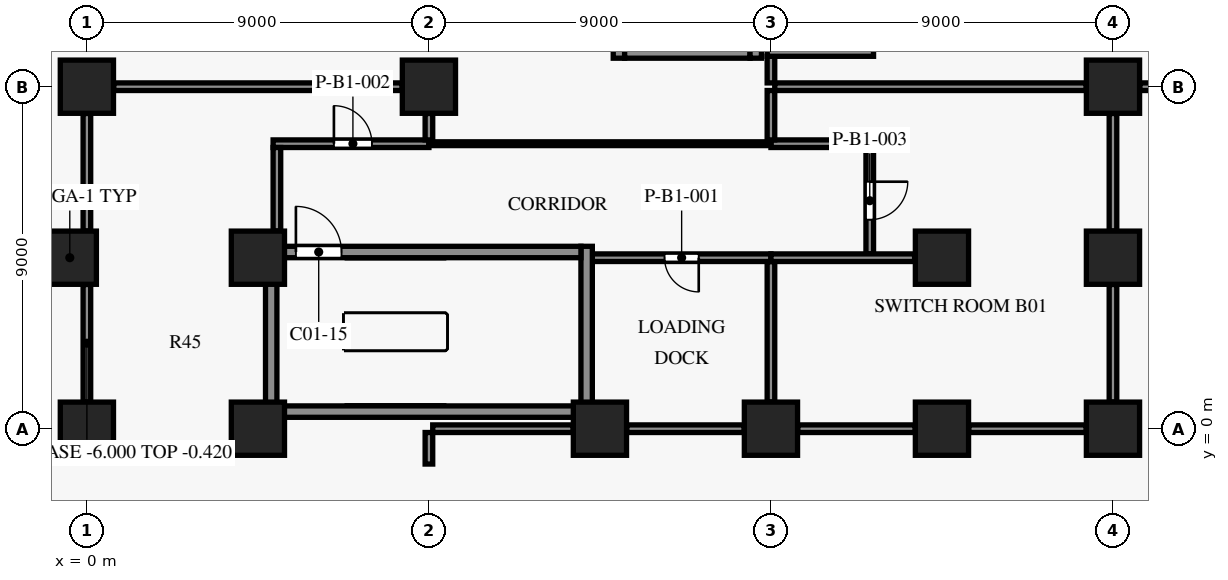
"""IFC4 building model, lengths in metres.
Left out: names, types, materials, properties, quantities, classifications, styles, units other than length and angle.
Written with IfcOpenShell. Run it as: python <this file> out.ifc"""

import sys

from ifc_helpers import new_model, si_unit, direction, frame, frame_2d, origin, origin_2d, place, context, subcontext, project, spatial, rectangle, extrude, element, fill, save


model = new_model("IFC4")
c1 = context("Model", 3, precision=1e-05, world=origin(), true_north=direction((0.0, 1.0)))
c2 = subcontext(c1, "Body", "Model", "MODEL_VIEW")
j1 = project(units=[si_unit("LENGTHUNIT", "METRE"), si_unit("PLANEANGLEUNIT", "RADIAN")], contexts=[c1])
p1 = place(None, origin())
s1 = spatial("IfcSite", under=j1, at=p1, CompositionType="ELEMENT")
p2 = place(p1, origin())
s2 = spatial("IfcBuilding", under=s1, at=p2, CompositionType="ELEMENT")
p3 = place(p2, frame((0.0, 0.0, -6.0)))
s3 = spatial("IfcBuildingStorey", under=s2, at=p3, CompositionType="ELEMENT", Elevation=-6.0)
for number, where, z_axis, x_axis in (
    (1, (4.5, 0.0, 0.0), (0.0, 0.0, 1.0), (1.0, 0.0, 0.0)),
    (2, (13.5, 0.0, 0.0), (0.0, 0.0, 1.0), (1.0, 0.0, 0.0)),
    (3, (22.5, 0.0, 0.0), (0.0, 0.0, 1.0), (1.0, 0.0, 0.0)),
    (4, (27.0, 4.5, 0.0), (0.0, 0.0, 1.0), (1.0, 0.0, 0.0)),
    (5, (27.0, 9.0, 0.0), (0.0, 0.0, 1.0), (1.0, 0.0, 0.0)),
    (6, (0.0, 9.0, 0.0), (0.0, 0.0, 1.0), (1.0, 0.0, 0.0)),
    (7, (-0.45, 4.5, 0.0), (0.0, 0.0, 1.0), (1.0, 0.0, 0.0)),
    (8, (4.5, 4.5, 0.0), (0.0, 0.0, 1.0), (1.0, 0.0, 0.0)),
    (9, (22.5, 4.5, 0.0), (0.0, 0.0, 1.0), (1.0, 0.0, 0.0)),
    (10, (0.0, 0.0, 0.0), (0.0, 0.0, 1.0), (1.0, 0.0, 0.0)),
    (11, (9.0, 9.0, 0.0), (0.0, 0.0, 1.0), (1.0, 0.0, 0.0)),
    (12, (18.0, 0.0, 0.0), (0.0, 0.0, 1.0), (1.0, 0.0, 0.0)),
    (13, (27.0, 0.0, 0.0), (0.0, 0.0, 1.0), (1.0, 0.0, 0.0)),
):
    element("IfcColumn", number, at=place(p3, frame(where, z_axis=z_axis, x_axis=x_axis)), inside=s3, PredefinedType="COLUMN", context=c2, shape_type="SweptSolid", body=[
        extrude(rectangle(XDim=1.4, YDim=1.4, at=origin_2d()), origin(), (0.0, 0.0, 1.0), 6.0),
    ])
p4 = place(p3, frame((5.0, 0.45, 0.0), z_axis=(0.0, 0.0, 1.0), x_axis=(1.0, 0.0, 0.0)))
e14 = element("IfcWall", 14, at=p4, inside=s3, PredefinedType="SHEAR", context=c2, shape_type="SweptSolid", body=[
    extrude(rectangle(XDim=8.0, YDim=0.3, at=frame_2d((4.0, 0.0))), origin(), (0.0, 0.0, 1.0), 5.6),
])
p5 = place(p3, frame((5.0, 4.65, 0.0), z_axis=(0.0, 0.0, 1.0), x_axis=(1.0, 0.0, 0.0)))
e15 = element("IfcWall", 15, at=p5, inside=s3, PredefinedType="SHEAR", context=c2, shape_type="SweptSolid", body=[
    extrude(rectangle(XDim=8.0, YDim=0.3, at=frame_2d((4.0, 0.0))), origin(), (0.0, 0.0, 1.0), 5.6),
])
p6 = place(p5, frame((0.5, 0.0, 0.0)))
e16 = element("IfcOpeningElement", 16, at=p6, cuts=e15, PredefinedType="OPENING", context=c2, shape_type="SweptSolid", body=[
    extrude(rectangle(XDim=1.2, YDim=2.2, at=frame_2d((0.6, 1.1))), frame((0.0, 0.16, 0.0), z_axis=(0.0, -1.0, 0.0), x_axis=(1.0, 0.0, 0.0)), (0.0, 0.0, 1.0), 0.32),
])
p7 = place(p3, frame((14.15, 9.9, 0.0), z_axis=(0.0, 0.0, 1.0), x_axis=(1.0, 0.0, 0.0)))
e17 = element("IfcWall", 17, at=p7, inside=s3, PredefinedType="SHEAR", context=c2, shape_type="SweptSolid", body=[
    extrude(rectangle(XDim=3.3, YDim=0.3, at=frame_2d((1.65, 0.0))), origin(), (0.0, 0.0, 1.0), 5.6),
])
for number, where, z_axis, x_axis in (
    (18, (4.85, 0.3, 0.0), (0.0, 0.0, 1.0), (0.0, 1.0, 0.0)),
    (19, (13.15, 0.3, 0.0), (0.0, 0.0, 1.0), (0.0, 1.0, 0.0)),
):
    element("IfcWall", number, at=place(p3, frame(where, z_axis=z_axis, x_axis=x_axis)), inside=s3, PredefinedType="SHEAR", context=c2, shape_type="SweptSolid", body=[
        extrude(rectangle(XDim=4.5, YDim=0.3, at=frame_2d((2.25, 0.0))), origin(), (0.0, 0.0, 1.0), 5.6),
    ])
p8 = place(p3, frame((14.0, 9.75, 0.0), z_axis=(0.0, 0.0, 1.0), x_axis=(0.0, 1.0, 0.0)))
e20 = element("IfcWall", 20, at=p8, inside=s3, PredefinedType="SHEAR", context=c2, shape_type="SweptSolid", body=[
    extrude(rectangle(XDim=8.3, YDim=0.3, at=frame_2d((4.15, 0.0))), origin(), (0.0, 0.0, 1.0), 5.6),
])
p9 = place(p3, frame((17.6, 9.75, 0.0), z_axis=(0.0, 0.0, 1.0), x_axis=(0.0, 1.0, 0.0)))
e21 = element("IfcWall", 21, at=p9, inside=s3, PredefinedType="SHEAR", context=c2, shape_type="SweptSolid", body=[
    extrude(rectangle(XDim=8.3, YDim=0.3, at=frame_2d((4.15, 0.0))), origin(), (0.0, 0.0, 1.0), 5.6),
])
p10 = place(p9, frame((0.65, 0.0, 0.0)))
e22 = element("IfcOpeningElement", 22, at=p10, cuts=e21, PredefinedType="OPENING", context=c2, shape_type="SweptSolid", body=[
    extrude(rectangle(XDim=1.2, YDim=2.2, at=frame_2d((0.6, 1.1))), frame((0.0, 0.16, 0.0), z_axis=(0.0, -1.0, 0.0), x_axis=(1.0, 0.0, 0.0)), (0.0, 0.0, 1.0), 0.32),
])
p11 = place(p3, frame((9.0, -0.1, 0.0), z_axis=(0.0, 0.0, 1.0), x_axis=(0.0, -1.0, 0.0)))
e23 = element("IfcWall", 23, at=p11, inside=s3, PredefinedType="PARTITIONING", context=c2, shape_type="SweptSolid", body=[
    extrude(rectangle(XDim=0.83, YDim=0.2, at=frame_2d((0.415, 0.0))), origin(), (0.0, 0.0, 1.0), 5.58),
])
p12 = place(p3, frame((12.795, 0.0, 0.0), z_axis=(0.0, 0.0, 1.0), x_axis=(-1.0, 0.0, 0.0)))
e24 = element("IfcWall", 24, at=p12, inside=s3, PredefinedType="PARTITIONING", context=c2, shape_type="SweptSolid", body=[
    extrude(rectangle(XDim=3.695, YDim=0.2, at=frame_2d((1.847, 0.0))), origin(), (0.0, 0.0, 1.0), 5.58),
])
for number, where, z_axis, x_axis in (
    (25, (17.295, 0.0, 0.0), (0.0, 0.0, 1.0), (-1.0, 0.0, 0.0)),
    (26, (21.795, 0.0, 0.0), (0.0, 0.0, 1.0), (-1.0, 0.0, 0.0)),
    (27, (26.295, 0.0, 0.0), (0.0, 0.0, 1.0), (-1.0, 0.0, 0.0)),
    (28, (0.0, 0.705, 0.0), (0.0, 0.0, 1.0), (0.0, 1.0, 0.0)),
    (29, (27.0, 3.795, 0.0), (0.0, 0.0, 1.0), (0.0, -1.0, 0.0)),
):
    element("IfcWall", number, at=place(p3, frame(where, z_axis=z_axis, x_axis=x_axis)), inside=s3, PredefinedType="PARTITIONING", context=c2, shape_type="SweptSolid", body=[
        extrude(rectangle(XDim=3.09, YDim=0.2, at=frame_2d((1.545, 0.0))), origin(), (0.0, 0.0, 1.0), 5.58),
    ])
p13 = place(p3, frame((18.0, 4.4, 0.0), z_axis=(0.0, 0.0, 1.0), x_axis=(0.0, -1.0, 0.0)))
e30 = element("IfcWall", 30, at=p13, inside=s3, PredefinedType="PARTITIONING", context=c2, shape_type="SweptSolid", body=[
    extrude(rectangle(XDim=3.695, YDim=0.2, at=frame_2d((1.847, 0.0))), origin(), (0.0, 0.0, 1.0), 5.58),
])
p14 = place(p3, frame((18.0, 4.5, 0.0), z_axis=(0.0, 0.0, 1.0), x_axis=(-1.0, 0.0, 0.0)))
e31 = element("IfcWall", 31, at=p14, inside=s3, PredefinedType="PARTITIONING", context=c2, shape_type="SweptSolid", body=[
    extrude(rectangle(XDim=4.7, YDim=0.2, at=frame_2d((2.35, 0.0))), origin(), (0.0, 0.0, 1.0), 5.58),
])
p15 = place(p14, frame((1.9, 0.0, 0.0)))
e32 = element("IfcOpeningElement", 32, at=p15, cuts=e31, PredefinedType="OPENING", context=c2, shape_type="SweptSolid", body=[
    extrude(rectangle(XDim=0.9, YDim=2.1, at=frame_2d((0.45, 1.05))), frame((0.0, 0.11, 0.0), z_axis=(0.0, -1.0, 0.0), x_axis=(1.0, 0.0, 0.0)), (0.0, 0.0, 1.0), 0.22),
])
p16 = place(p3, frame((21.78, 4.5, 0.0), z_axis=(0.0, 0.0, 1.0), x_axis=(-1.0, 0.0, 0.0)))
e33 = element("IfcWall", 33, at=p16, inside=s3, PredefinedType="PARTITIONING", context=c2, shape_type="SweptSolid", body=[
    extrude(rectangle(XDim=3.78, YDim=0.2, at=frame_2d((1.89, 0.0))), origin(), (0.0, 0.0, 1.0), 5.58),
])
p17 = place(p3, frame((0.0, 5.205, 0.0), z_axis=(0.0, 0.0, 1.0), x_axis=(0.0, 1.0, 0.0)))
e34 = element("IfcWall", 34, at=p17, inside=s3, PredefinedType="PARTITIONING", context=c2, shape_type="SweptSolid", body=[
    extrude(rectangle(XDim=3.09, YDim=0.2, at=frame_2d((1.545, 0.0))), origin(), (0.0, 0.0, 1.0), 5.58),
])
p18 = place(p3, frame((5.0, 5.205, 0.0), z_axis=(0.0, 0.0, 1.0), x_axis=(0.0, 1.0, 0.0)))
e35 = element("IfcWall", 35, at=p18, inside=s3, PredefinedType="PARTITIONING", context=c2, shape_type="SweptSolid", body=[
    extrude(rectangle(XDim=2.195, YDim=0.2, at=frame_2d((1.097, 0.0))), origin(), (0.0, 0.0, 1.0), 5.58),
])
p19 = place(p3, frame((20.6, 7.4, 0.0), z_axis=(0.0, 0.0, 1.0), x_axis=(0.0, -1.0, 0.0)))
e36 = element("IfcWall", 36, at=p19, inside=s3, PredefinedType="PARTITIONING", context=c2, shape_type="SweptSolid", body=[
    extrude(rectangle(XDim=2.8, YDim=0.2, at=frame_2d((1.4, 0.0))), origin(), (0.0, 0.0, 1.0), 5.58),
])
p20 = place(p19, frame((0.9, 0.0, 0.0)))
e37 = element("IfcOpeningElement", 37, at=p20, cuts=e36, PredefinedType="OPENING", context=c2, shape_type="SweptSolid", body=[
    extrude(rectangle(XDim=1.0, YDim=2.1, at=frame_2d((0.5, 1.05))), frame((0.0, 0.11, 0.0), z_axis=(0.0, -1.0, 0.0), x_axis=(1.0, 0.0, 0.0)), (0.0, 0.0, 1.0), 0.22),
])
p21 = place(p3, frame((4.9, 7.5, 0.0), z_axis=(0.0, 0.0, 1.0), x_axis=(1.0, 0.0, 0.0)))
e38 = element("IfcWall", 38, at=p21, inside=s3, PredefinedType="PARTITIONING", context=c2, shape_type="SweptSolid", body=[
    extrude(rectangle(XDim=4.1, YDim=0.2, at=frame_2d((2.05, 0.0))), origin(), (0.0, 0.0, 1.0), 5.58),
])
p22 = place(p21, frame((1.6, 0.0, 0.0)))
e39 = element("IfcOpeningElement", 39, at=p22, cuts=e38, PredefinedType="OPENING", context=c2, shape_type="SweptSolid", body=[
    extrude(rectangle(XDim=1.0, YDim=2.1, at=frame_2d((0.5, 1.05))), frame((0.0, 0.11, 0.0), z_axis=(0.0, -1.0, 0.0), x_axis=(1.0, 0.0, 0.0)), (0.0, 0.0, 1.0), 0.22),
])
p23 = place(p3, frame((9.0, 7.5, 0.0), z_axis=(0.0, 0.0, 1.0), x_axis=(1.0, 0.0, 0.0)))
e40 = element("IfcWall", 40, at=p23, inside=s3, PredefinedType="PARTITIONING", context=c2, shape_type="SweptSolid", body=[
    extrude(rectangle(XDim=9.0, YDim=0.1, at=frame_2d((4.5, 0.0))), origin(), (0.0, 0.0, 1.0), 5.58),
])
p24 = place(p3, frame((18.0, 7.5, 0.0), z_axis=(0.0, 0.0, 1.0), x_axis=(1.0, 0.0, 0.0)))
e41 = element("IfcWall", 41, at=p24, inside=s3, PredefinedType="PARTITIONING", context=c2, shape_type="SweptSolid", body=[
    extrude(rectangle(XDim=2.7, YDim=0.2, at=frame_2d((1.35, 0.0))), origin(), (0.0, 0.0, 1.0), 5.58),
])
p25 = place(p3, frame((18.0, 7.6, 0.0), z_axis=(0.0, 0.0, 1.0), x_axis=(0.0, 1.0, 0.0)))
e42 = element("IfcWall", 42, at=p25, inside=s3, PredefinedType="PARTITIONING", context=c2, shape_type="SweptSolid", body=[
    extrude(rectangle(XDim=1.3, YDim=0.2, at=frame_2d((0.65, 0.0))), origin(), (0.0, 0.0, 1.0), 5.58),
])
p26 = place(p3, frame((9.0, 8.295, 0.0), z_axis=(0.0, 0.0, 1.0), x_axis=(0.0, -1.0, 0.0)))
e43 = element("IfcWall", 43, at=p26, inside=s3, PredefinedType="PARTITIONING", context=c2, shape_type="SweptSolid", body=[
    extrude(rectangle(XDim=0.695, YDim=0.2, at=frame_2d((0.347, 0.0))), origin(), (0.0, 0.0, 1.0), 5.58),
])
p27 = place(p3, frame((27.0, 8.295, 0.0), z_axis=(0.0, 0.0, 1.0), x_axis=(0.0, -1.0, 0.0)))
e44 = element("IfcWall", 44, at=p27, inside=s3, PredefinedType="PARTITIONING", context=c2, shape_type="SweptSolid", body=[
    extrude(rectangle(XDim=3.09, YDim=0.2, at=frame_2d((1.545, 0.0))), origin(), (0.0, 0.0, 1.0), 5.58),
])
p28 = place(p3, frame((0.705, 9.0, 0.0), z_axis=(0.0, 0.0, 1.0), x_axis=(1.0, 0.0, 0.0)))
e45 = element("IfcWall", 45, at=p28, inside=s3, PredefinedType="PARTITIONING", context=c2, shape_type="SweptSolid", body=[
    extrude(rectangle(XDim=7.59, YDim=0.2, at=frame_2d((3.795, 0.0))), origin(), (0.0, 0.0, 1.0), 5.58),
])
p29 = place(p3, frame((18.1, 9.0, 0.0), z_axis=(0.0, 0.0, 1.0), x_axis=(1.0, 0.0, 0.0)))
e46 = element("IfcWall", 46, at=p29, inside=s3, PredefinedType="PARTITIONING", context=c2, shape_type="SweptSolid", body=[
    extrude(rectangle(XDim=8.195, YDim=0.2, at=frame_2d((4.097, 0.0))), origin(), (0.0, 0.0, 1.0), 5.58),
])
p30 = place(p3, frame((36.1, 9.0, 0.0), z_axis=(0.0, 0.0, 1.0), x_axis=(-1.0, 0.0, 0.0)))
e47 = element("IfcWall", 47, at=p30, inside=s3, PredefinedType="PARTITIONING", context=c2, shape_type="SweptSolid", body=[
    extrude(rectangle(XDim=8.395, YDim=0.2, at=frame_2d((4.198, 0.0))), origin(), (0.0, 0.0, 1.0), 5.58),
])
p31 = place(p3, frame((18.0, 9.1, 0.0), z_axis=(0.0, 0.0, 1.0), x_axis=(0.0, 1.0, 0.0)))
e48 = element("IfcWall", 48, at=p31, inside=s3, PredefinedType="PARTITIONING", context=c2, shape_type="SweptSolid", body=[
    extrude(rectangle(XDim=0.7, YDim=0.2, at=frame_2d((0.35, 0.0))), origin(), (0.0, 0.0, 1.0), 5.58),
])
p32 = place(p3, frame((20.7, 9.9, 0.0), z_axis=(0.0, 0.0, 1.0), x_axis=(-1.0, 0.0, 0.0)))
e49 = element("IfcWall", 49, at=p32, inside=s3, PredefinedType="PARTITIONING", context=c2, shape_type="SweptSolid", body=[
    extrude(rectangle(XDim=2.8, YDim=0.2, at=frame_2d((1.4, 0.0))), origin(), (0.0, 0.0, 1.0), 5.58),
])
p33 = place(p6, origin())
e50 = element("IfcDoor", 50, at=p33, inside=s3, OperationType="SINGLE_SWING_LEFT", PredefinedType="DOOR", context=c2, shape_type="SweptSolid", body=[
    extrude(rectangle(XDim=1.2, YDim=2.2, at=frame_2d((0.6, 1.1))), frame((0.0, 0.025, 0.0), z_axis=(0.0, -1.0, 0.0), x_axis=(1.0, 0.0, 0.0)), (0.0, 0.0, 1.0), 0.05),
])
fill(e16, e50)
p34 = place(p15, origin())
e51 = element("IfcDoor", 51, at=p34, inside=s3, OperationType="SINGLE_SWING_LEFT", PredefinedType="DOOR", context=c2, shape_type="SweptSolid", body=[
    extrude(rectangle(XDim=0.9, YDim=2.1, at=frame_2d((0.45, 1.05))), frame((0.0, 0.025, 0.0), z_axis=(0.0, -1.0, 0.0), x_axis=(1.0, 0.0, 0.0)), (0.0, 0.0, 1.0), 0.05),
])
fill(e32, e51)
p35 = place(p22, origin())
e52 = element("IfcDoor", 52, at=p35, inside=s3, OperationType="SINGLE_SWING_LEFT", PredefinedType="DOOR", context=c2, shape_type="SweptSolid", body=[
    extrude(rectangle(XDim=1.0, YDim=2.1, at=frame_2d((0.5, 1.05))), frame((0.0, 0.025, 0.0), z_axis=(0.0, -1.0, 0.0), x_axis=(1.0, 0.0, 0.0)), (0.0, 0.0, 1.0), 0.05),
])
fill(e39, e52)
p36 = place(p20, origin())
e53 = element("IfcDoor", 53, at=p36, inside=s3, OperationType="SINGLE_SWING_LEFT", PredefinedType="DOOR", context=c2, shape_type="SweptSolid", body=[
    extrude(rectangle(XDim=1.0, YDim=2.1, at=frame_2d((0.5, 1.05))), frame((0.0, 0.025, 0.0), z_axis=(0.0, -1.0, 0.0), x_axis=(1.0, 0.0, 0.0)), (0.0, 0.0, 1.0), 0.05),
])
fill(e37, e53)
save(model, sys.argv[1])
